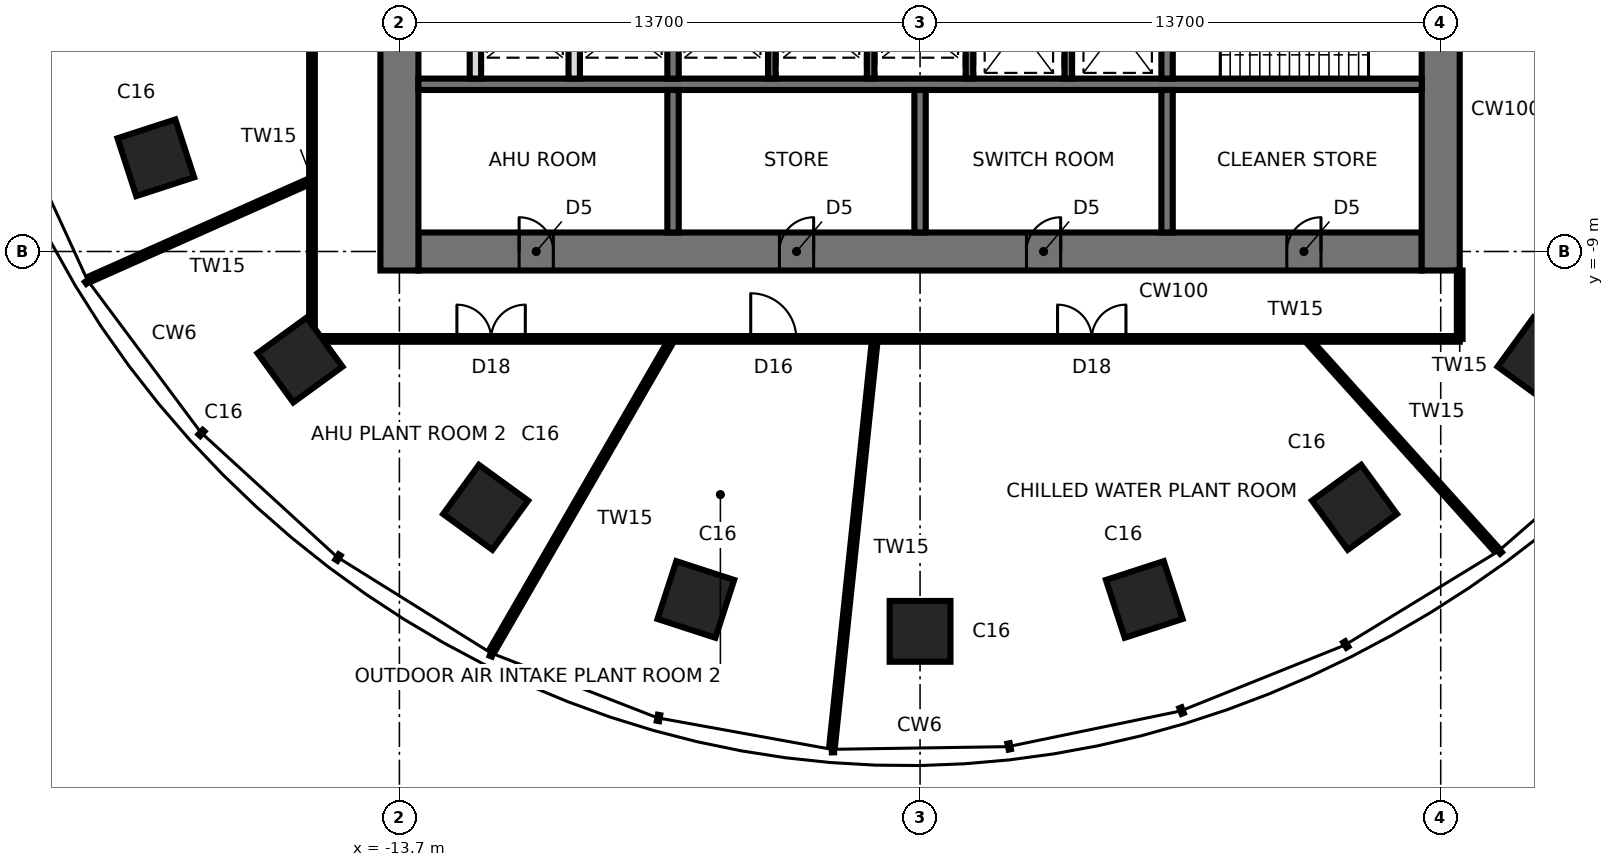
"""IFC4 building model, lengths in metres.
Left out: names, types, materials, properties, quantities, classifications, styles, units other than length and angle.
Written with IfcOpenShell. Run it as: python <this file> out.ifc"""

import sys

from ifc_helpers import new_model, si_unit, direction, frame, frame_2d, origin, origin_2d, place, context, subcontext, project, spatial, rectangle, extrude, element, fill, save


model = new_model("IFC4")
c1 = context("Model", 3, precision=1e-05, world=origin(), true_north=direction((0.0, 1.0)))
c2 = subcontext(c1, "Body", "Model", "MODEL_VIEW")
j1 = project(units=[si_unit("LENGTHUNIT", "METRE"), si_unit("PLANEANGLEUNIT", "RADIAN")], contexts=[c1])
p1 = place(None, origin())
s1 = spatial("IfcSite", under=j1, at=p1, CompositionType="ELEMENT")
p2 = place(p1, origin())
s2 = spatial("IfcBuilding", under=s1, at=p2, CompositionType="ELEMENT")
p3 = place(p2, frame((0.0, 0.0, 166.5)))
s3 = spatial("IfcBuildingStorey", under=s2, at=p3, CompositionType="ELEMENT", Elevation=166.5)
for number, where, z_axis, x_axis in (
    (1, (-20.109, -6.534, 0.0), (0.0, 0.0, 1.0), (-0.951, -0.309, 0.0)),
    (2, (-16.315, -11.854, 0.0), (0.0, 0.0, 1.0), (-0.809, -0.588, 0.0)),
    (3, (-11.43, -15.733, 0.0), (0.0, 0.0, 1.0), (-0.588, -0.809, 0.0)),
    (4, (-5.9, -18.157, 0.0), (0.0, 0.0, 1.0), (-0.309, -0.951, 0.0)),
    (5, (0.0, -18.996, 0.0), (0.0, 0.0, 1.0), (0.0, -1.0, 0.0)),
    (6, (5.9, -18.157, 0.0), (0.0, 0.0, 1.0), (0.309, -0.951, 0.0)),
    (7, (11.43, -15.733, 0.0), (0.0, 0.0, 1.0), (0.588, -0.809, 0.0)),
    (8, (16.315, -11.854, 0.0), (0.0, 0.0, 1.0), (0.809, -0.588, 0.0)),
):
    element("IfcColumn", number, at=place(p3, frame(where, z_axis=z_axis, x_axis=x_axis)), inside=s3, PredefinedType="COLUMN", context=c2, shape_type="SweptSolid", body=[
        extrude(rectangle(XDim=1.6, YDim=1.6, at=origin_2d()), origin(), (0.0, 0.0, 1.0), 5.6),
    ])
p4 = place(p3, frame((-13.2, -9.0, 0.0), z_axis=(0.0, 0.0, 1.0), x_axis=(1.0, 0.0, 0.0)))
e9 = element("IfcWall", 9, at=p4, inside=s3, PredefinedType="SHEAR", context=c2, shape_type="SweptSolid", body=[
    extrude(rectangle(XDim=26.4, YDim=1.0, at=frame_2d((13.2, 0.0))), origin(), (0.0, 0.0, 1.0), 5.6),
])
p5 = place(p4, frame((2.65, 0.0, 0.0)))
e10 = element("IfcOpeningElement", 10, at=p5, cuts=e9, PredefinedType="OPENING", context=c2, shape_type="SweptSolid", body=[
    extrude(rectangle(XDim=0.9, YDim=2.1, at=frame_2d((0.45, 1.05))), frame((0.0, 0.51, 0.0), z_axis=(0.0, -1.0, 0.0), x_axis=(1.0, 0.0, 0.0)), (0.0, 0.0, 1.0), 1.02),
])
p6 = place(p4, frame((9.5, 0.0, 0.0)))
e11 = element("IfcOpeningElement", 11, at=p6, cuts=e9, PredefinedType="OPENING", context=c2, shape_type="SweptSolid", body=[
    extrude(rectangle(XDim=0.9, YDim=2.1, at=frame_2d((0.45, 1.05))), frame((0.0, 0.51, 0.0), z_axis=(0.0, -1.0, 0.0), x_axis=(1.0, 0.0, 0.0)), (0.0, 0.0, 1.0), 1.02),
])
p7 = place(p4, frame((16.0, 0.0, 0.0)))
e12 = element("IfcOpeningElement", 12, at=p7, cuts=e9, PredefinedType="OPENING", context=c2, shape_type="SweptSolid", body=[
    extrude(rectangle(XDim=0.9, YDim=2.1, at=frame_2d((0.45, 1.05))), frame((0.0, 0.51, 0.0), z_axis=(0.0, -1.0, 0.0), x_axis=(1.0, 0.0, 0.0)), (0.0, 0.0, 1.0), 1.02),
])
p8 = place(p4, frame((22.85, 0.0, 0.0)))
e13 = element("IfcOpeningElement", 13, at=p8, cuts=e9, PredefinedType="OPENING", context=c2, shape_type="SweptSolid", body=[
    extrude(rectangle(XDim=0.9, YDim=2.1, at=frame_2d((0.45, 1.05))), frame((0.0, 0.51, 0.0), z_axis=(0.0, -1.0, 0.0), x_axis=(1.0, 0.0, 0.0)), (0.0, 0.0, 1.0), 1.02),
])
p9 = place(p3, frame((13.7, -9.5, 0.0), z_axis=(0.0, 0.0, 1.0), x_axis=(0.0, 1.0, 0.0)))
e14 = element("IfcWall", 14, at=p9, inside=s3, PredefinedType="SHEAR", context=c2, shape_type="SweptSolid", body=[
    extrude(rectangle(XDim=19.0, YDim=1.0, at=frame_2d((9.5, 0.0))), origin(), (0.0, 0.0, 1.0), 5.6),
])
p10 = place(p9, frame((8.6, 0.0, 0.0)))
e15 = element("IfcOpeningElement", 15, at=p10, cuts=e14, PredefinedType="OPENING", context=c2, shape_type="SweptSolid", body=[
    extrude(rectangle(XDim=1.8, YDim=2.4, at=frame_2d((0.9, 1.2))), frame((0.0, 0.51, 0.0), z_axis=(0.0, -1.0, 0.0), x_axis=(1.0, 0.0, 0.0)), (0.0, 0.0, 1.0), 1.02),
])
p11 = place(p3, frame((-13.7, 9.5, 0.0), z_axis=(0.0, 0.0, 1.0), x_axis=(0.0, -1.0, 0.0)))
e16 = element("IfcWall", 16, at=p11, inside=s3, PredefinedType="SHEAR", context=c2, shape_type="SweptSolid", body=[
    extrude(rectangle(XDim=19.0, YDim=1.0, at=frame_2d((9.5, 0.0))), origin(), (0.0, 0.0, 1.0), 5.6),
])
p12 = place(p11, frame((8.6, 0.0, 0.0)))
e17 = element("IfcOpeningElement", 17, at=p12, cuts=e16, PredefinedType="OPENING", context=c2, shape_type="SweptSolid", body=[
    extrude(rectangle(XDim=1.8, YDim=2.4, at=frame_2d((0.9, 1.2))), frame((0.0, 0.51, 0.0), z_axis=(0.0, -1.0, 0.0), x_axis=(1.0, 0.0, 0.0)), (0.0, 0.0, 1.0), 1.02),
])
p13 = place(p3, frame((-13.2, -4.6, 0.0), z_axis=(0.0, 0.0, 1.0), x_axis=(1.0, 0.0, 0.0)))
e18 = element("IfcWall", 18, at=p13, inside=s3, PredefinedType="SHEAR", context=c2, shape_type="SweptSolid", body=[
    extrude(rectangle(XDim=26.4, YDim=0.3, at=frame_2d((13.2, 0.0))), origin(), (0.0, 0.0, 1.0), 5.6),
])
p14 = place(p3, frame((-6.5, -1.75, 0.0), z_axis=(0.0, 0.0, 1.0), x_axis=(0.0, -1.0, 0.0)))
e19 = element("IfcWall", 19, at=p14, inside=s3, PredefinedType="SHEAR", context=c2, shape_type="SweptSolid", body=[
    extrude(rectangle(XDim=2.7, YDim=0.3, at=frame_2d((1.35, 0.0))), origin(), (0.0, 0.0, 1.0), 5.6),
])
p15 = place(p3, frame((-6.5, -4.75, 0.0), z_axis=(0.0, 0.0, 1.0), x_axis=(0.0, -1.0, 0.0)))
e20 = element("IfcWall", 20, at=p15, inside=s3, PredefinedType="SHEAR", context=c2, shape_type="SweptSolid", body=[
    extrude(rectangle(XDim=3.75, YDim=0.3, at=frame_2d((1.875, 0.0))), origin(), (0.0, 0.0, 1.0), 5.6),
])
p16 = place(p3, frame((6.5, -1.75, 0.0), z_axis=(0.0, 0.0, 1.0), x_axis=(0.0, -1.0, 0.0)))
e21 = element("IfcWall", 21, at=p16, inside=s3, PredefinedType="SHEAR", context=c2, shape_type="SweptSolid", body=[
    extrude(rectangle(XDim=2.7, YDim=0.3, at=frame_2d((1.35, 0.0))), origin(), (0.0, 0.0, 1.0), 5.6),
])
p17 = place(p3, frame((6.5, -4.75, 0.0), z_axis=(0.0, 0.0, 1.0), x_axis=(0.0, -1.0, 0.0)))
e22 = element("IfcWall", 22, at=p17, inside=s3, PredefinedType="SHEAR", context=c2, shape_type="SweptSolid", body=[
    extrude(rectangle(XDim=3.75, YDim=0.3, at=frame_2d((1.875, 0.0))), origin(), (0.0, 0.0, 1.0), 5.6),
])
for number, where, z_axis, x_axis in (
    (23, (-3.9, -1.75, 0.0), (0.0, 0.0, 1.0), (0.0, -1.0, 0.0)),
    (24, (-1.3, -1.75, 0.0), (0.0, 0.0, 1.0), (0.0, -1.0, 0.0)),
    (25, (1.3, -1.75, 0.0), (0.0, 0.0, 1.0), (0.0, -1.0, 0.0)),
    (26, (3.9, -1.75, 0.0), (0.0, 0.0, 1.0), (0.0, -1.0, 0.0)),
):
    element("IfcWall", number, at=place(p3, frame(where, z_axis=z_axis, x_axis=x_axis)), inside=s3, PredefinedType="SHEAR", context=c2, shape_type="SweptSolid", body=[
        extrude(rectangle(XDim=2.7, YDim=0.2, at=frame_2d((1.35, 0.0))), origin(), (0.0, 0.0, 1.0), 5.6),
    ])
p18 = place(p3, frame((0.0, -4.75, 0.0), z_axis=(0.0, 0.0, 1.0), x_axis=(0.0, -1.0, 0.0)))
e27 = element("IfcWall", 27, at=p18, inside=s3, PredefinedType="SHEAR", context=c2, shape_type="SweptSolid", body=[
    extrude(rectangle(XDim=3.75, YDim=0.3, at=frame_2d((1.875, 0.0))), origin(), (0.0, 0.0, 1.0), 5.6),
])
for number, where, z_axis, x_axis in (
    (28, (-9.1, -1.75, 0.0), (0.0, 0.0, 1.0), (0.0, -1.0, 0.0)),
    (29, (-11.7, -1.75, 0.0), (0.0, 0.0, 1.0), (0.0, -1.0, 0.0)),
):
    element("IfcWall", number, at=place(p3, frame(where, z_axis=z_axis, x_axis=x_axis)), inside=s3, PredefinedType="SOLIDWALL", context=c2, shape_type="SweptSolid", body=[
        extrude(rectangle(XDim=2.7, YDim=0.3, at=frame_2d((1.35, 0.0))), origin(), (0.0, 0.0, 1.0), 5.4),
    ])
p19 = place(p3, frame((-16.0, -7.124, 0.0), z_axis=(0.0, 0.0, 1.0), x_axis=(-0.913548180065, -0.406730528359, 0.0)))
e30 = element("IfcWall", 30, at=p19, inside=s3, PredefinedType="PARTITIONING", context=c2, shape_type="SweptSolid", body=[
    extrude(rectangle(XDim=6.388, YDim=0.15, at=frame_2d((3.194, 0.0))), origin(), (0.0, 0.0, 1.0), 5.4),
])
p20 = place(p3, frame((-6.524, -11.3, 0.0), z_axis=(0.0, 0.0, 1.0), x_axis=(-0.499999424553, -0.866025736019, 0.0)))
e31 = element("IfcWall", 31, at=p20, inside=s3, PredefinedType="PARTITIONING", context=c2, shape_type="SweptSolid", body=[
    extrude(rectangle(XDim=9.461, YDim=0.15, at=frame_2d((4.731, 0.0))), origin(), (0.0, 0.0, 1.0), 5.4),
])
p21 = place(p3, frame((-1.188, -11.3, 0.0), z_axis=(0.0, 0.0, 1.0), x_axis=(-0.104520910244, -0.994522689194, 0.0)))
e32 = element("IfcWall", 32, at=p21, inside=s3, PredefinedType="PARTITIONING", context=c2, shape_type="SweptSolid", body=[
    extrude(rectangle(XDim=10.78, YDim=0.15, at=frame_2d((5.39, 0.0))), origin(), (0.0, 0.0, 1.0), 5.4),
])
p22 = place(p3, frame((-16.0, -11.3, 0.0), z_axis=(0.0, 0.0, 1.0), x_axis=(1.0, 0.0, 0.0)))
e33 = element("IfcWall", 33, at=p22, inside=s3, PredefinedType="PARTITIONING", context=c2, shape_type="SweptSolid", body=[
    extrude(rectangle(XDim=30.2, YDim=0.15, at=frame_2d((15.1, 0.0))), origin(), (0.0, 0.0, 1.0), 5.4),
])
p23 = place(p22, frame((3.813, 0.0, 0.0)))
e34 = element("IfcOpeningElement", 34, at=p23, cuts=e33, PredefinedType="OPENING", context=c2, shape_type="SweptSolid", body=[
    extrude(rectangle(XDim=1.8, YDim=2.4, at=frame_2d((0.9, 1.2))), frame((0.0, 0.085, 0.0), z_axis=(0.0, -1.0, 0.0), x_axis=(1.0, 0.0, 0.0)), (0.0, 0.0, 1.0), 0.17),
])
p24 = place(p22, frame((11.544, 0.0, 0.0)))
e35 = element("IfcOpeningElement", 35, at=p24, cuts=e33, PredefinedType="OPENING", context=c2, shape_type="SweptSolid", body=[
    extrude(rectangle(XDim=1.2, YDim=2.1, at=frame_2d((0.6, 1.05))), frame((0.0, 0.085, 0.0), z_axis=(0.0, -1.0, 0.0), x_axis=(1.0, 0.0, 0.0)), (0.0, 0.0, 1.0), 0.17),
])
p25 = place(p22, frame((19.618, 0.0, 0.0)))
e36 = element("IfcOpeningElement", 36, at=p25, cuts=e33, PredefinedType="OPENING", context=c2, shape_type="SweptSolid", body=[
    extrude(rectangle(XDim=1.8, YDim=2.4, at=frame_2d((0.9, 1.2))), frame((0.0, 0.085, 0.0), z_axis=(0.0, -1.0, 0.0), x_axis=(1.0, 0.0, 0.0)), (0.0, 0.0, 1.0), 0.17),
])
p26 = place(p3, frame((15.156, -16.833, 0.0), z_axis=(0.0, 0.0, 1.0), x_axis=(-0.669129591277, 0.74314573946, 0.0)))
e37 = element("IfcWall", 37, at=p26, inside=s3, PredefinedType="PARTITIONING", context=c2, shape_type="SweptSolid", body=[
    extrude(rectangle(XDim=7.445, YDim=0.15, at=frame_2d((3.722, 0.0))), origin(), (0.0, 0.0, 1.0), 5.4),
])
p27 = place(p3, frame((14.2, -11.3, 0.0), z_axis=(0.0, 0.0, 1.0), x_axis=(0.0, 1.0, 0.0)))
e38 = element("IfcWall", 38, at=p27, inside=s3, PredefinedType="PARTITIONING", context=c2, shape_type="SweptSolid", body=[
    extrude(rectangle(XDim=1.8, YDim=0.15, at=frame_2d((0.9, 0.0))), origin(), (0.0, 0.0, 1.0), 5.4),
])
p28 = place(p3, frame((-16.0, 11.3, 0.0), z_axis=(0.0, 0.0, 1.0), x_axis=(0.0, -1.0, 0.0)))
e39 = element("IfcWall", 39, at=p28, inside=s3, PredefinedType="PARTITIONING", context=c2, shape_type="SweptSolid", body=[
    extrude(rectangle(XDim=22.6, YDim=0.15, at=frame_2d((11.3, 0.0))), origin(), (0.0, 0.0, 1.0), 5.4),
])
p29 = place(p28, frame((5.438, 0.0, 0.0)))
e40 = element("IfcOpeningElement", 40, at=p29, cuts=e39, PredefinedType="OPENING", context=c2, shape_type="SweptSolid", body=[
    extrude(rectangle(XDim=1.2, YDim=2.1, at=frame_2d((0.6, 1.05))), frame((0.0, 0.085, 0.0), z_axis=(0.0, -1.0, 0.0), x_axis=(1.0, 0.0, 0.0)), (0.0, 0.0, 1.0), 0.17),
])
p30 = place(p28, frame((12.261, 0.0, 0.0)))
e41 = element("IfcOpeningElement", 41, at=p30, cuts=e39, PredefinedType="OPENING", context=c2, shape_type="SweptSolid", body=[
    extrude(rectangle(XDim=1.8, YDim=2.4, at=frame_2d((0.9, 1.2))), frame((0.0, 0.085, 0.0), z_axis=(0.0, -1.0, 0.0), x_axis=(1.0, 0.0, 0.0)), (0.0, 0.0, 1.0), 0.17),
])
p31 = place(p5, origin())
e42 = element("IfcDoor", 42, at=p31, inside=s3, OperationType="SINGLE_SWING_LEFT", PredefinedType="DOOR", context=c2, shape_type="SweptSolid", body=[
    extrude(rectangle(XDim=0.82, YDim=2.06, at=frame_2d((0.45, 1.03))), frame((0.0, 0.025, 0.0), z_axis=(0.0, -1.0, 0.0), x_axis=(1.0, 0.0, 0.0)), (0.0, 0.0, 1.0), 0.05),
    extrude(rectangle(XDim=0.04, YDim=2.1, at=frame_2d((0.02, 1.05))), frame((0.0, 0.25, 0.0), z_axis=(0.0, -1.0, 0.0), x_axis=(1.0, 0.0, 0.0)), (0.0, 0.0, 1.0), 0.5),
    extrude(rectangle(XDim=0.04, YDim=2.1, at=frame_2d((0.88, 1.05))), frame((0.0, 0.25, 0.0), z_axis=(0.0, -1.0, 0.0), x_axis=(1.0, 0.0, 0.0)), (0.0, 0.0, 1.0), 0.5),
    extrude(rectangle(XDim=0.82, YDim=0.04, at=frame_2d((0.45, 2.08))), frame((0.0, 0.25, 0.0), z_axis=(0.0, -1.0, 0.0), x_axis=(1.0, 0.0, 0.0)), (0.0, 0.0, 1.0), 0.5),
])
fill(e10, e42)
p32 = place(p6, origin())
e43 = element("IfcDoor", 43, at=p32, inside=s3, OperationType="SINGLE_SWING_RIGHT", PredefinedType="DOOR", context=c2, shape_type="SweptSolid", body=[
    extrude(rectangle(XDim=0.82, YDim=2.06, at=frame_2d((0.45, 1.03))), frame((0.0, 0.025, 0.0), z_axis=(0.0, -1.0, 0.0), x_axis=(1.0, 0.0, 0.0)), (0.0, 0.0, 1.0), 0.05),
    extrude(rectangle(XDim=0.04, YDim=2.1, at=frame_2d((0.02, 1.05))), frame((0.0, 0.25, 0.0), z_axis=(0.0, -1.0, 0.0), x_axis=(1.0, 0.0, 0.0)), (0.0, 0.0, 1.0), 0.5),
    extrude(rectangle(XDim=0.04, YDim=2.1, at=frame_2d((0.88, 1.05))), frame((0.0, 0.25, 0.0), z_axis=(0.0, -1.0, 0.0), x_axis=(1.0, 0.0, 0.0)), (0.0, 0.0, 1.0), 0.5),
    extrude(rectangle(XDim=0.82, YDim=0.04, at=frame_2d((0.45, 2.08))), frame((0.0, 0.25, 0.0), z_axis=(0.0, -1.0, 0.0), x_axis=(1.0, 0.0, 0.0)), (0.0, 0.0, 1.0), 0.5),
])
fill(e11, e43)
p33 = place(p7, origin())
e44 = element("IfcDoor", 44, at=p33, inside=s3, OperationType="SINGLE_SWING_RIGHT", PredefinedType="DOOR", context=c2, shape_type="SweptSolid", body=[
    extrude(rectangle(XDim=0.82, YDim=2.06, at=frame_2d((0.45, 1.03))), frame((0.0, 0.025, 0.0), z_axis=(0.0, -1.0, 0.0), x_axis=(1.0, 0.0, 0.0)), (0.0, 0.0, 1.0), 0.05),
    extrude(rectangle(XDim=0.04, YDim=2.1, at=frame_2d((0.02, 1.05))), frame((0.0, 0.25, 0.0), z_axis=(0.0, -1.0, 0.0), x_axis=(1.0, 0.0, 0.0)), (0.0, 0.0, 1.0), 0.5),
    extrude(rectangle(XDim=0.04, YDim=2.1, at=frame_2d((0.88, 1.05))), frame((0.0, 0.25, 0.0), z_axis=(0.0, -1.0, 0.0), x_axis=(1.0, 0.0, 0.0)), (0.0, 0.0, 1.0), 0.5),
    extrude(rectangle(XDim=0.82, YDim=0.04, at=frame_2d((0.45, 2.08))), frame((0.0, 0.25, 0.0), z_axis=(0.0, -1.0, 0.0), x_axis=(1.0, 0.0, 0.0)), (0.0, 0.0, 1.0), 0.5),
])
fill(e12, e44)
p34 = place(p8, origin())
e45 = element("IfcDoor", 45, at=p34, inside=s3, OperationType="SINGLE_SWING_RIGHT", PredefinedType="DOOR", context=c2, shape_type="SweptSolid", body=[
    extrude(rectangle(XDim=0.82, YDim=2.06, at=frame_2d((0.45, 1.03))), frame((0.0, 0.025, 0.0), z_axis=(0.0, -1.0, 0.0), x_axis=(1.0, 0.0, 0.0)), (0.0, 0.0, 1.0), 0.05),
    extrude(rectangle(XDim=0.04, YDim=2.1, at=frame_2d((0.02, 1.05))), frame((0.0, 0.25, 0.0), z_axis=(0.0, -1.0, 0.0), x_axis=(1.0, 0.0, 0.0)), (0.0, 0.0, 1.0), 0.5),
    extrude(rectangle(XDim=0.04, YDim=2.1, at=frame_2d((0.88, 1.05))), frame((0.0, 0.25, 0.0), z_axis=(0.0, -1.0, 0.0), x_axis=(1.0, 0.0, 0.0)), (0.0, 0.0, 1.0), 0.5),
    extrude(rectangle(XDim=0.82, YDim=0.04, at=frame_2d((0.45, 2.08))), frame((0.0, 0.25, 0.0), z_axis=(0.0, -1.0, 0.0), x_axis=(1.0, 0.0, 0.0)), (0.0, 0.0, 1.0), 0.5),
])
fill(e13, e45)
p35 = place(p23, origin())
e46 = element("IfcDoor", 46, at=p35, inside=s3, OperationType="DOUBLE_DOOR_SINGLE_SWING", PredefinedType="DOOR", context=c2, shape_type="SweptSolid", body=[
    extrude(rectangle(XDim=1.8, YDim=2.4, at=frame_2d((0.9, 1.2))), frame((0.0, 0.025, 0.0), z_axis=(0.0, -1.0, 0.0), x_axis=(1.0, 0.0, 0.0)), (0.0, 0.0, 1.0), 0.05),
])
fill(e34, e46)
p36 = place(p24, origin())
e47 = element("IfcDoor", 47, at=p36, inside=s3, OperationType="SINGLE_SWING_LEFT", PredefinedType="DOOR", context=c2, shape_type="SweptSolid", body=[
    extrude(rectangle(XDim=1.2, YDim=2.1, at=frame_2d((0.6, 1.05))), frame((0.0, 0.025, 0.0), z_axis=(0.0, -1.0, 0.0), x_axis=(1.0, 0.0, 0.0)), (0.0, 0.0, 1.0), 0.05),
])
fill(e35, e47)
p37 = place(p25, origin())
e48 = element("IfcDoor", 48, at=p37, inside=s3, OperationType="DOUBLE_DOOR_SINGLE_SWING", PredefinedType="DOOR", context=c2, shape_type="SweptSolid", body=[
    extrude(rectangle(XDim=1.8, YDim=2.4, at=frame_2d((0.9, 1.2))), frame((0.0, 0.025, 0.0), z_axis=(0.0, -1.0, 0.0), x_axis=(1.0, 0.0, 0.0)), (0.0, 0.0, 1.0), 0.05),
])
fill(e36, e48)
save(model, sys.argv[1])
